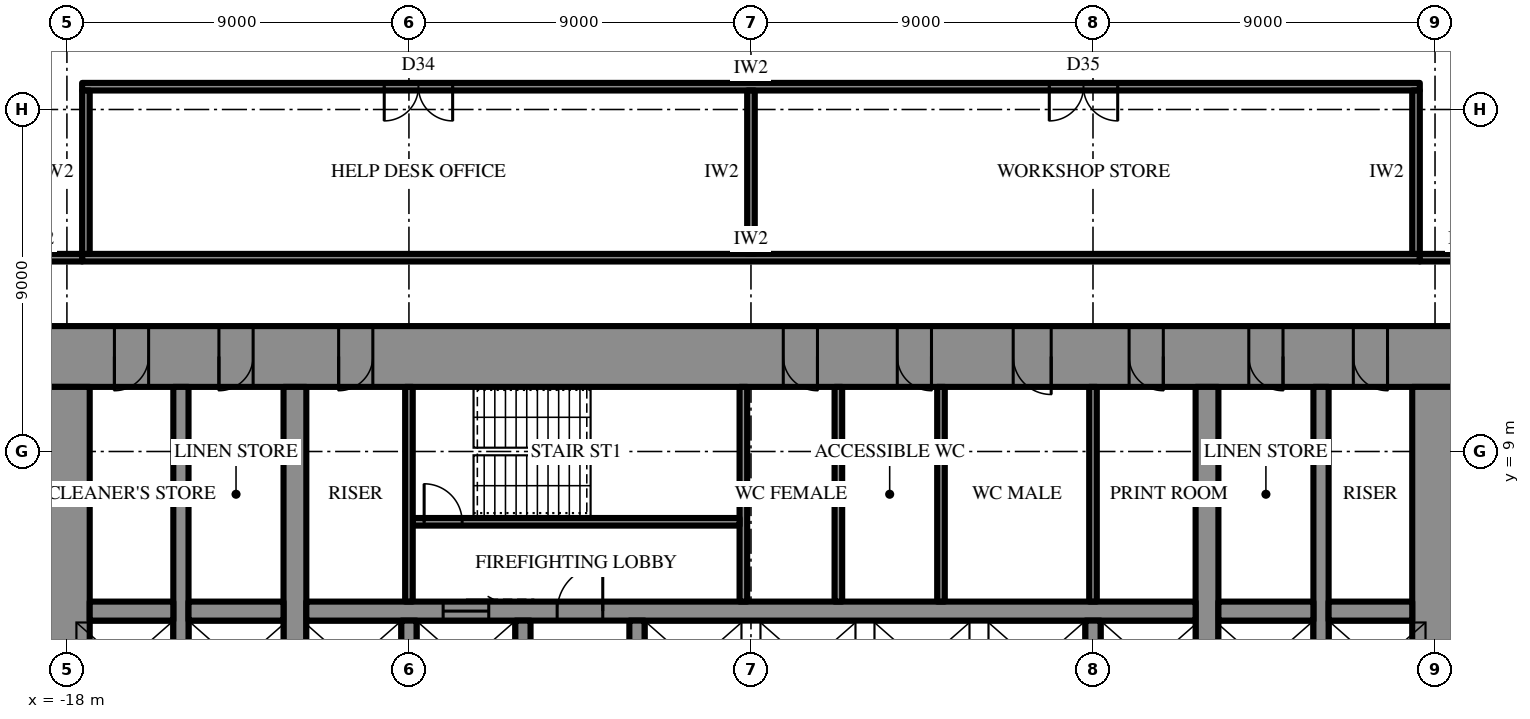
"""IFC4 building model, lengths in metres.
Left out: names, types, materials, properties, quantities, classifications, styles, units other than length and angle.
Written with IfcOpenShell. Run it as: python <this file> out.ifc"""

import sys

from ifc_helpers import new_model, si_unit, direction, frame, frame_2d, origin, place, context, subcontext, project, spatial, rectangle, extrude, element, fill, save


model = new_model("IFC4")
c1 = context("Model", 3, precision=1e-05, world=origin(), true_north=direction((0.0, 1.0)))
c2 = subcontext(c1, "Body", "Model", "MODEL_VIEW")
j1 = project(units=[si_unit("LENGTHUNIT", "METRE"), si_unit("PLANEANGLEUNIT", "RADIAN")], contexts=[c1])
p1 = place(None, origin())
s1 = spatial("IfcSite", under=j1, at=p1, CompositionType="ELEMENT")
p2 = place(p1, origin())
s2 = spatial("IfcBuilding", under=s1, at=p2, CompositionType="ELEMENT")
p3 = place(p2, frame((0.0, 0.0, 90.7)))
s3 = spatial("IfcBuildingStorey", under=s2, at=p3, CompositionType="ELEMENT", Elevation=90.7)
p4 = place(p3, frame((-18.6, 11.5, 0.0), z_axis=(0.0, 0.0, 1.0), x_axis=(1.0, 0.0, 0.0)))
e1 = element("IfcWall", 1, at=p4, inside=s3, PredefinedType="SHEAR", context=c2, shape_type="SweptSolid", body=[
    extrude(rectangle(XDim=37.2, YDim=1.6, at=frame_2d((18.6, 0.0))), origin(), (0.0, 0.0, 1.0), 4.2),
])
p5 = place(p4, frame((19.45, 0.0, 0.0)))
e2 = element("IfcOpeningElement", 2, at=p5, cuts=e1, PredefinedType="OPENING", context=c2, shape_type="SweptSolid", body=[
    extrude(rectangle(XDim=0.9, YDim=2.2, at=frame_2d((0.45, 1.1))), frame((0.0, 0.81, 0.0), z_axis=(0.0, -1.0, 0.0), x_axis=(1.0, 0.0, 0.0)), (0.0, 0.0, 1.0), 1.62),
])
p6 = place(p4, frame((22.45, 0.0, 0.0)))
e3 = element("IfcOpeningElement", 3, at=p6, cuts=e1, PredefinedType="OPENING", context=c2, shape_type="SweptSolid", body=[
    extrude(rectangle(XDim=0.9, YDim=2.2, at=frame_2d((0.45, 1.1))), frame((0.0, 0.81, 0.0), z_axis=(0.0, -1.0, 0.0), x_axis=(1.0, 0.0, 0.0)), (0.0, 0.0, 1.0), 1.62),
])
p7 = place(p4, frame((25.5, 0.0, 0.0)))
e4 = element("IfcOpeningElement", 4, at=p7, cuts=e1, PredefinedType="OPENING", context=c2, shape_type="SweptSolid", body=[
    extrude(rectangle(XDim=1.0, YDim=2.2, at=frame_2d((0.5, 1.1))), frame((0.0, 0.81, 0.0), z_axis=(0.0, -1.0, 0.0), x_axis=(1.0, 0.0, 0.0)), (0.0, 0.0, 1.0), 1.62),
])
p8 = place(p4, frame((1.85, 0.0, 0.0)))
e5 = element("IfcOpeningElement", 5, at=p8, cuts=e1, PredefinedType="OPENING", context=c2, shape_type="SweptSolid", body=[
    extrude(rectangle(XDim=0.9, YDim=2.2, at=frame_2d((0.45, 1.1))), frame((0.0, 0.81, 0.0), z_axis=(0.0, -1.0, 0.0), x_axis=(1.0, 0.0, 0.0)), (0.0, 0.0, 1.0), 1.62),
])
p9 = place(p4, frame((4.6, 0.0, 0.0)))
e6 = element("IfcOpeningElement", 6, at=p9, cuts=e1, PredefinedType="OPENING", context=c2, shape_type="SweptSolid", body=[
    extrude(rectangle(XDim=0.9, YDim=2.2, at=frame_2d((0.45, 1.1))), frame((0.0, 0.81, 0.0), z_axis=(0.0, -1.0, 0.0), x_axis=(1.0, 0.0, 0.0)), (0.0, 0.0, 1.0), 1.62),
])
p10 = place(p4, frame((7.75, 0.0, 0.0)))
e7 = element("IfcOpeningElement", 7, at=p10, cuts=e1, PredefinedType="OPENING", context=c2, shape_type="SweptSolid", body=[
    extrude(rectangle(XDim=0.9, YDim=2.2, at=frame_2d((0.45, 1.1))), frame((0.0, 0.81, 0.0), z_axis=(0.0, -1.0, 0.0), x_axis=(1.0, 0.0, 0.0)), (0.0, 0.0, 1.0), 1.62),
])
p11 = place(p4, frame((28.55, 0.0, 0.0)))
e8 = element("IfcOpeningElement", 8, at=p11, cuts=e1, PredefinedType="OPENING", context=c2, shape_type="SweptSolid", body=[
    extrude(rectangle(XDim=0.9, YDim=2.2, at=frame_2d((0.45, 1.1))), frame((0.0, 0.81, 0.0), z_axis=(0.0, -1.0, 0.0), x_axis=(1.0, 0.0, 0.0)), (0.0, 0.0, 1.0), 1.62),
])
p12 = place(p4, frame((31.7, 0.0, 0.0)))
e9 = element("IfcOpeningElement", 9, at=p12, cuts=e1, PredefinedType="OPENING", context=c2, shape_type="SweptSolid", body=[
    extrude(rectangle(XDim=0.9, YDim=2.2, at=frame_2d((0.45, 1.1))), frame((0.0, 0.81, 0.0), z_axis=(0.0, -1.0, 0.0), x_axis=(1.0, 0.0, 0.0)), (0.0, 0.0, 1.0), 1.62),
])
p13 = place(p4, frame((34.45, 0.0, 0.0)))
e10 = element("IfcOpeningElement", 10, at=p13, cuts=e1, PredefinedType="OPENING", context=c2, shape_type="SweptSolid", body=[
    extrude(rectangle(XDim=0.9, YDim=2.2, at=frame_2d((0.45, 1.1))), frame((0.0, 0.81, 0.0), z_axis=(0.0, -1.0, 0.0), x_axis=(1.0, 0.0, 0.0)), (0.0, 0.0, 1.0), 1.62),
])
p14 = place(p3, frame((18.0, -10.7, 0.0), z_axis=(0.0, 0.0, 1.0), x_axis=(0.0, 1.0, 0.0)))
e11 = element("IfcWall", 11, at=p14, inside=s3, PredefinedType="SHEAR", context=c2, shape_type="SweptSolid", body=[
    extrude(rectangle(XDim=21.4, YDim=1.2, at=frame_2d((10.7, 0.0))), origin(), (0.0, 0.0, 1.0), 4.2),
])
p15 = place(p14, frame((9.8, 0.0, 0.0)))
e12 = element("IfcOpeningElement", 12, at=p15, cuts=e11, PredefinedType="OPENING", context=c2, shape_type="SweptSolid", body=[
    extrude(rectangle(XDim=1.8, YDim=2.4, at=frame_2d((0.9, 1.2))), frame((0.0, 0.61, 0.0), z_axis=(0.0, -1.0, 0.0), x_axis=(1.0, 0.0, 0.0)), (0.0, 0.0, 1.0), 1.22),
])
p16 = place(p3, frame((-18.0, 10.7, 0.0), z_axis=(0.0, 0.0, 1.0), x_axis=(0.0, -1.0, 0.0)))
e13 = element("IfcWall", 13, at=p16, inside=s3, PredefinedType="SHEAR", context=c2, shape_type="SweptSolid", body=[
    extrude(rectangle(XDim=21.4, YDim=1.2, at=frame_2d((10.7, 0.0))), origin(), (0.0, 0.0, 1.0), 4.2),
])
p17 = place(p16, frame((9.8, 0.0, 0.0)))
e14 = element("IfcOpeningElement", 14, at=p17, cuts=e13, PredefinedType="OPENING", context=c2, shape_type="SweptSolid", body=[
    extrude(rectangle(XDim=1.8, YDim=2.4, at=frame_2d((0.9, 1.2))), frame((0.0, 0.61, 0.0), z_axis=(0.0, -1.0, 0.0), x_axis=(1.0, 0.0, 0.0)), (0.0, 0.0, 1.0), 1.22),
])
p18 = place(p3, frame((12.0, -10.7, 0.0), z_axis=(0.0, 0.0, 1.0), x_axis=(0.0, 1.0, 0.0)))
e15 = element("IfcWall", 15, at=p18, inside=s3, PredefinedType="SHEAR", context=c2, shape_type="SweptSolid", body=[
    extrude(rectangle(XDim=21.4, YDim=0.6, at=frame_2d((10.7, 0.0))), origin(), (0.0, 0.0, 1.0), 4.2),
])
p19 = place(p18, frame((9.8, 0.0, 0.0)))
e16 = element("IfcOpeningElement", 16, at=p19, cuts=e15, PredefinedType="OPENING", context=c2, shape_type="SweptSolid", body=[
    extrude(rectangle(XDim=1.8, YDim=2.4, at=frame_2d((0.9, 1.2))), frame((0.0, 0.31, 0.0), z_axis=(0.0, -1.0, 0.0), x_axis=(1.0, 0.0, 0.0)), (0.0, 0.0, 1.0), 0.62),
])
p20 = place(p3, frame((-12.0, -10.7, 0.0), z_axis=(0.0, 0.0, 1.0), x_axis=(0.0, 1.0, 0.0)))
e17 = element("IfcWall", 17, at=p20, inside=s3, PredefinedType="SHEAR", context=c2, shape_type="SweptSolid", body=[
    extrude(rectangle(XDim=21.4, YDim=0.6, at=frame_2d((10.7, 0.0))), origin(), (0.0, 0.0, 1.0), 4.2),
])
p21 = place(p20, frame((9.8, 0.0, 0.0)))
e18 = element("IfcOpeningElement", 18, at=p21, cuts=e17, PredefinedType="OPENING", context=c2, shape_type="SweptSolid", body=[
    extrude(rectangle(XDim=1.8, YDim=2.4, at=frame_2d((0.9, 1.2))), frame((0.0, 0.31, 0.0), z_axis=(0.0, -1.0, 0.0), x_axis=(1.0, 0.0, 0.0)), (0.0, 0.0, 1.0), 0.62),
])
p22 = place(p3, frame((15.0, -10.7, 0.0), z_axis=(0.0, 0.0, 1.0), x_axis=(0.0, 1.0, 0.0)))
e19 = element("IfcWall", 19, at=p22, inside=s3, PredefinedType="SHEAR", context=c2, shape_type="SweptSolid", body=[
    extrude(rectangle(XDim=21.4, YDim=0.4, at=frame_2d((10.7, 0.0))), origin(), (0.0, 0.0, 1.0), 4.2),
])
p23 = place(p22, frame((9.8, 0.0, 0.0)))
e20 = element("IfcOpeningElement", 20, at=p23, cuts=e19, PredefinedType="OPENING", context=c2, shape_type="SweptSolid", body=[
    extrude(rectangle(XDim=1.8, YDim=2.4, at=frame_2d((0.9, 1.2))), frame((0.0, 0.21, 0.0), z_axis=(0.0, -1.0, 0.0), x_axis=(1.0, 0.0, 0.0)), (0.0, 0.0, 1.0), 0.42),
])
p24 = place(p3, frame((-15.0, -10.7, 0.0), z_axis=(0.0, 0.0, 1.0), x_axis=(0.0, 1.0, 0.0)))
e21 = element("IfcWall", 21, at=p24, inside=s3, PredefinedType="SHEAR", context=c2, shape_type="SweptSolid", body=[
    extrude(rectangle(XDim=21.4, YDim=0.4, at=frame_2d((10.7, 0.0))), origin(), (0.0, 0.0, 1.0), 4.2),
])
p25 = place(p24, frame((9.8, 0.0, 0.0)))
e22 = element("IfcOpeningElement", 22, at=p25, cuts=e21, PredefinedType="OPENING", context=c2, shape_type="SweptSolid", body=[
    extrude(rectangle(XDim=1.8, YDim=2.4, at=frame_2d((0.9, 1.2))), frame((0.0, 0.21, 0.0), z_axis=(0.0, -1.0, 0.0), x_axis=(1.0, 0.0, 0.0)), (0.0, 0.0, 1.0), 0.42),
])
p26 = place(p3, frame((-17.4, 4.8, 0.0), z_axis=(0.0, 0.0, 1.0), x_axis=(1.0, 0.0, 0.0)))
e23 = element("IfcWall", 23, at=p26, inside=s3, PredefinedType="SHEAR", context=c2, shape_type="SweptSolid", body=[
    extrude(rectangle(XDim=2.2, YDim=0.5, at=frame_2d((1.1, 0.0))), origin(), (0.0, 0.0, 1.0), 4.2),
])
p27 = place(p3, frame((-14.8, 4.8, 0.0), z_axis=(0.0, 0.0, 1.0), x_axis=(1.0, 0.0, 0.0)))
e24 = element("IfcWall", 24, at=p27, inside=s3, PredefinedType="SHEAR", context=c2, shape_type="SweptSolid", body=[
    extrude(rectangle(XDim=2.5, YDim=0.5, at=frame_2d((1.25, 0.0))), origin(), (0.0, 0.0, 1.0), 4.2),
])
p28 = place(p3, frame((-11.7, 4.8, 0.0), z_axis=(0.0, 0.0, 1.0), x_axis=(1.0, 0.0, 0.0)))
e25 = element("IfcWall", 25, at=p28, inside=s3, PredefinedType="SHEAR", context=c2, shape_type="SweptSolid", body=[
    extrude(rectangle(XDim=23.4, YDim=0.5, at=frame_2d((11.7, 0.0))), origin(), (0.0, 0.0, 1.0), 4.2),
])
p29 = place(p28, frame((6.6, 0.0, 0.0)))
e26 = element("IfcOpeningElement", 26, at=p29, cuts=e25, PredefinedType="OPENING", context=c2, shape_type="SweptSolid", body=[
    extrude(rectangle(XDim=1.2, YDim=2.2, at=frame_2d((0.6, 1.1))), frame((0.0, 0.26, 0.0), z_axis=(0.0, -1.0, 0.0), x_axis=(1.0, 0.0, 0.0)), (0.0, 0.0, 1.0), 0.52),
])
p30 = place(p28, frame((3.6, 0.0, 0.0)))
e27 = element("IfcOpeningElement", 27, at=p30, cuts=e25, PredefinedType="OPENING", context=c2, shape_type="SweptSolid", body=[
    extrude(rectangle(XDim=1.2, YDim=2.2, at=frame_2d((0.6, 1.1))), frame((0.0, 0.26, 0.0), z_axis=(0.0, -1.0, 0.0), x_axis=(1.0, 0.0, 0.0)), (0.0, 0.0, 1.0), 0.52),
])
p31 = place(p3, frame((12.3, 4.8, 0.0), z_axis=(0.0, 0.0, 1.0), x_axis=(1.0, 0.0, 0.0)))
e28 = element("IfcWall", 28, at=p31, inside=s3, PredefinedType="SHEAR", context=c2, shape_type="SweptSolid", body=[
    extrude(rectangle(XDim=2.5, YDim=0.5, at=frame_2d((1.25, 0.0))), origin(), (0.0, 0.0, 1.0), 4.2),
])
p32 = place(p3, frame((15.2, 4.8, 0.0), z_axis=(0.0, 0.0, 1.0), x_axis=(1.0, 0.0, 0.0)))
e29 = element("IfcWall", 29, at=p32, inside=s3, PredefinedType="SHEAR", context=c2, shape_type="SweptSolid", body=[
    extrude(rectangle(XDim=2.2, YDim=0.5, at=frame_2d((1.1, 0.0))), origin(), (0.0, 0.0, 1.0), 4.2),
])
for number, where, z_axis, x_axis in (
    (30, (-9.0, 2.25, 0.0), (0.0, 0.0, 1.0), (0.0, 1.0, 0.0)),
    (31, (-6.0, 2.25, 0.0), (0.0, 0.0, 1.0), (0.0, 1.0, 0.0)),
    (32, (-3.0, 2.25, 0.0), (0.0, 0.0, 1.0), (0.0, 1.0, 0.0)),
    (33, (9.0, 2.25, 0.0), (0.0, 0.0, 1.0), (0.0, 1.0, 0.0)),
):
    element("IfcWall", number, at=place(p3, frame(where, z_axis=z_axis, x_axis=x_axis)), inside=s3, PredefinedType="SHEAR", context=c2, shape_type="SweptSolid", body=[
        extrude(rectangle(XDim=2.3, YDim=0.4, at=frame_2d((1.15, 0.0))), origin(), (0.0, 0.0, 1.0), 4.2),
    ])
p33 = place(p3, frame((-0.2, 5.05, 0.0), z_axis=(0.0, 0.0, 1.0), x_axis=(0.0, 1.0, 0.0)))
e34 = element("IfcWall", 34, at=p33, inside=s3, PredefinedType="SHEAR", context=c2, shape_type="SweptSolid", body=[
    extrude(rectangle(XDim=5.65, YDim=0.2, at=frame_2d((2.825, 0.0))), origin(), (0.0, 0.0, 1.0), 4.2),
])
p34 = place(p3, frame((-8.9, 7.15, 0.0), z_axis=(0.0, 0.0, 1.0), x_axis=(1.0, 0.0, 0.0)))
e35 = element("IfcWall", 35, at=p34, inside=s3, PredefinedType="SHEAR", context=c2, shape_type="SweptSolid", body=[
    extrude(rectangle(XDim=8.6, YDim=0.2, at=frame_2d((4.3, 0.0))), origin(), (0.0, 0.0, 1.0), 4.2),
])
p35 = place(p34, frame((0.3, 0.0, 0.0)))
e36 = element("IfcOpeningElement", 36, at=p35, cuts=e35, PredefinedType="OPENING", context=c2, shape_type="SweptSolid", body=[
    extrude(rectangle(XDim=1.0, YDim=2.2, at=frame_2d((0.5, 1.1))), frame((0.0, 0.11, 0.0), z_axis=(0.0, -1.0, 0.0), x_axis=(1.0, 0.0, 0.0)), (0.0, 0.0, 1.0), 0.22),
])
for number, where, z_axis, x_axis in (
    (37, (-9.0, 5.05, 0.0), (0.0, 0.0, 1.0), (0.0, 1.0, 0.0)),
    (38, (9.0, 5.05, 0.0), (0.0, 0.0, 1.0), (0.0, 1.0, 0.0)),
    (39, (2.3, 5.05, 0.0), (0.0, 0.0, 1.0), (0.0, 1.0, 0.0)),
    (40, (5.0, 5.05, 0.0), (0.0, 0.0, 1.0), (0.0, 1.0, 0.0)),
):
    element("IfcWall", number, at=place(p3, frame(where, z_axis=z_axis, x_axis=x_axis)), inside=s3, PredefinedType="PARTITIONING", context=c2, shape_type="SweptSolid", body=[
        extrude(rectangle(XDim=5.65, YDim=0.2, at=frame_2d((2.825, 0.0))), origin(), (0.0, 0.0, 1.0), 4.0),
    ])
p36 = place(p3, frame((-17.6, 14.1, 0.0), z_axis=(0.0, 0.0, 1.0), x_axis=(1.0, 0.0, 0.0)))
e41 = element("IfcWall", 41, at=p36, inside=s3, PredefinedType="PARTITIONING", context=c2, shape_type="SweptSolid", body=[
    extrude(rectangle(XDim=35.2, YDim=0.2, at=frame_2d((17.6, 0.0))), origin(), (0.0, 0.0, 1.0), 4.0),
])
p37 = place(p3, frame((-17.6, 18.6, 0.0), z_axis=(0.0, 0.0, 1.0), x_axis=(1.0, 0.0, 0.0)))
e42 = element("IfcWall", 42, at=p37, inside=s3, PredefinedType="PARTITIONING", context=c2, shape_type="SweptSolid", body=[
    extrude(rectangle(XDim=35.2, YDim=0.2, at=frame_2d((17.6, 0.0))), origin(), (0.0, 0.0, 1.0), 4.0),
])
p38 = place(p37, frame((7.95, 0.0, 0.0)))
e43 = element("IfcOpeningElement", 43, at=p38, cuts=e42, PredefinedType="OPENING", context=c2, shape_type="SweptSolid", body=[
    extrude(rectangle(XDim=1.8, YDim=2.4, at=frame_2d((0.9, 1.2))), frame((0.0, 0.11, 0.0), z_axis=(0.0, -1.0, 0.0), x_axis=(1.0, 0.0, 0.0)), (0.0, 0.0, 1.0), 0.22),
])
p39 = place(p37, frame((25.45, 0.0, 0.0)))
e44 = element("IfcOpeningElement", 44, at=p39, cuts=e42, PredefinedType="OPENING", context=c2, shape_type="SweptSolid", body=[
    extrude(rectangle(XDim=1.8, YDim=2.4, at=frame_2d((0.9, 1.2))), frame((0.0, 0.11, 0.0), z_axis=(0.0, -1.0, 0.0), x_axis=(1.0, 0.0, 0.0)), (0.0, 0.0, 1.0), 0.22),
])
p40 = place(p3, frame((-17.5, 14.2, 0.0), z_axis=(0.0, 0.0, 1.0), x_axis=(0.0, 1.0, 0.0)))
e45 = element("IfcWall", 45, at=p40, inside=s3, PredefinedType="PARTITIONING", context=c2, shape_type="SweptSolid", body=[
    extrude(rectangle(XDim=4.3, YDim=0.2, at=frame_2d((2.15, 0.0))), origin(), (0.0, 0.0, 1.0), 4.0),
])
p41 = place(p3, frame((0.0, 14.2, 0.0), z_axis=(0.0, 0.0, 1.0), x_axis=(0.0, 1.0, 0.0)))
e46 = element("IfcWall", 46, at=p41, inside=s3, PredefinedType="PARTITIONING", context=c2, shape_type="SweptSolid", body=[
    extrude(rectangle(XDim=4.3, YDim=0.2, at=frame_2d((2.15, 0.0))), origin(), (0.0, 0.0, 1.0), 2.944),
])
p42 = place(p3, frame((17.5, 14.2, 0.0), z_axis=(0.0, 0.0, 1.0), x_axis=(0.0, 1.0, 0.0)))
e47 = element("IfcWall", 47, at=p42, inside=s3, PredefinedType="PARTITIONING", context=c2, shape_type="SweptSolid", body=[
    extrude(rectangle(XDim=4.3, YDim=0.2, at=frame_2d((2.15, 0.0))), origin(), (0.0, 0.0, 1.0), 4.0),
])
for number, where, z_axis, x_axis in (
    (48, (-20.0, 14.1, 0.0), (0.0, 0.0, 1.0), (1.0, 0.0, 0.0)),
    (49, (17.6, 14.1, 0.0), (0.0, 0.0, 1.0), (1.0, 0.0, 0.0)),
):
    element("IfcWall", number, at=place(p3, frame(where, z_axis=z_axis, x_axis=x_axis)), inside=s3, PredefinedType="PARTITIONING", context=c2, shape_type="SweptSolid", body=[
        extrude(rectangle(XDim=2.4, YDim=0.2, at=frame_2d((1.2, 0.0))), origin(), (0.0, 0.0, 1.0), 4.0),
    ])
p43 = place(p29, origin())
e50 = element("IfcDoor", 50, at=p43, inside=s3, OperationType="SINGLE_SWING_LEFT", PredefinedType="DOOR", context=c2, shape_type="SweptSolid", body=[
    extrude(rectangle(XDim=1.2, YDim=2.2, at=frame_2d((0.6, 1.1))), frame((0.0, 0.025, 0.0), z_axis=(0.0, -1.0, 0.0), x_axis=(1.0, 0.0, 0.0)), (0.0, 0.0, 1.0), 0.05),
])
fill(e26, e50)
p44 = place(p35, origin())
e51 = element("IfcDoor", 51, at=p44, inside=s3, OperationType="SINGLE_SWING_RIGHT", PredefinedType="DOOR", context=c2, shape_type="SweptSolid", body=[
    extrude(rectangle(XDim=1.0, YDim=2.2, at=frame_2d((0.5, 1.1))), frame((0.0, 0.025, 0.0), z_axis=(0.0, -1.0, 0.0), x_axis=(1.0, 0.0, 0.0)), (0.0, 0.0, 1.0), 0.05),
])
fill(e36, e51)
p45 = place(p5, frame((0.9, 0.0, 0.0), z_axis=(0.0, 0.0, 1.0), x_axis=(-1.0, 0.0, 0.0)))
e52 = element("IfcDoor", 52, at=p45, inside=s3, OperationType="SINGLE_SWING_RIGHT", PredefinedType="DOOR", context=c2, shape_type="SweptSolid", body=[
    extrude(rectangle(XDim=0.9, YDim=2.2, at=frame_2d((0.45, 1.1))), frame((0.0, 0.025, 0.0), z_axis=(0.0, -1.0, 0.0), x_axis=(1.0, 0.0, 0.0)), (0.0, 0.0, 1.0), 0.05),
])
fill(e2, e52)
p46 = place(p6, frame((0.9, 0.0, 0.0), z_axis=(0.0, 0.0, 1.0), x_axis=(-1.0, 0.0, 0.0)))
e53 = element("IfcDoor", 53, at=p46, inside=s3, OperationType="SINGLE_SWING_RIGHT", PredefinedType="DOOR", context=c2, shape_type="SweptSolid", body=[
    extrude(rectangle(XDim=0.9, YDim=2.2, at=frame_2d((0.45, 1.1))), frame((0.0, 0.025, 0.0), z_axis=(0.0, -1.0, 0.0), x_axis=(1.0, 0.0, 0.0)), (0.0, 0.0, 1.0), 0.05),
])
fill(e3, e53)
p47 = place(p7, frame((1.0, 0.0, 0.0), z_axis=(0.0, 0.0, 1.0), x_axis=(-1.0, 0.0, 0.0)))
e54 = element("IfcDoor", 54, at=p47, inside=s3, OperationType="SINGLE_SWING_RIGHT", PredefinedType="DOOR", context=c2, shape_type="SweptSolid", body=[
    extrude(rectangle(XDim=1.0, YDim=2.2, at=frame_2d((0.5, 1.1))), frame((0.0, 0.025, 0.0), z_axis=(0.0, -1.0, 0.0), x_axis=(1.0, 0.0, 0.0)), (0.0, 0.0, 1.0), 0.05),
])
fill(e4, e54)
p48 = place(p8, frame((0.9, 0.0, 0.0), z_axis=(0.0, 0.0, 1.0), x_axis=(-1.0, 0.0, 0.0)))
e55 = element("IfcDoor", 55, at=p48, inside=s3, OperationType="SINGLE_SWING_LEFT", PredefinedType="DOOR", context=c2, shape_type="SweptSolid", body=[
    extrude(rectangle(XDim=0.9, YDim=2.2, at=frame_2d((0.45, 1.1))), frame((0.0, 0.025, 0.0), z_axis=(0.0, -1.0, 0.0), x_axis=(1.0, 0.0, 0.0)), (0.0, 0.0, 1.0), 0.05),
])
fill(e5, e55)
p49 = place(p9, frame((0.9, 0.0, 0.0), z_axis=(0.0, 0.0, 1.0), x_axis=(-1.0, 0.0, 0.0)))
e56 = element("IfcDoor", 56, at=p49, inside=s3, OperationType="SINGLE_SWING_LEFT", PredefinedType="DOOR", context=c2, shape_type="SweptSolid", body=[
    extrude(rectangle(XDim=0.9, YDim=2.2, at=frame_2d((0.45, 1.1))), frame((0.0, 0.025, 0.0), z_axis=(0.0, -1.0, 0.0), x_axis=(1.0, 0.0, 0.0)), (0.0, 0.0, 1.0), 0.05),
])
fill(e6, e56)
p50 = place(p10, frame((0.9, 0.0, 0.0), z_axis=(0.0, 0.0, 1.0), x_axis=(-1.0, 0.0, 0.0)))
e57 = element("IfcDoor", 57, at=p50, inside=s3, OperationType="SINGLE_SWING_LEFT", PredefinedType="DOOR", context=c2, shape_type="SweptSolid", body=[
    extrude(rectangle(XDim=0.9, YDim=2.2, at=frame_2d((0.45, 1.1))), frame((0.0, 0.025, 0.0), z_axis=(0.0, -1.0, 0.0), x_axis=(1.0, 0.0, 0.0)), (0.0, 0.0, 1.0), 0.05),
])
fill(e7, e57)
p51 = place(p11, frame((0.9, 0.0, 0.0), z_axis=(0.0, 0.0, 1.0), x_axis=(-1.0, 0.0, 0.0)))
e58 = element("IfcDoor", 58, at=p51, inside=s3, OperationType="SINGLE_SWING_RIGHT", PredefinedType="DOOR", context=c2, shape_type="SweptSolid", body=[
    extrude(rectangle(XDim=0.9, YDim=2.2, at=frame_2d((0.45, 1.1))), frame((0.0, 0.025, 0.0), z_axis=(0.0, -1.0, 0.0), x_axis=(1.0, 0.0, 0.0)), (0.0, 0.0, 1.0), 0.05),
])
fill(e8, e58)
p52 = place(p12, frame((0.9, 0.0, 0.0), z_axis=(0.0, 0.0, 1.0), x_axis=(-1.0, 0.0, 0.0)))
e59 = element("IfcDoor", 59, at=p52, inside=s3, OperationType="SINGLE_SWING_RIGHT", PredefinedType="DOOR", context=c2, shape_type="SweptSolid", body=[
    extrude(rectangle(XDim=0.9, YDim=2.2, at=frame_2d((0.45, 1.1))), frame((0.0, 0.025, 0.0), z_axis=(0.0, -1.0, 0.0), x_axis=(1.0, 0.0, 0.0)), (0.0, 0.0, 1.0), 0.05),
])
fill(e9, e59)
p53 = place(p13, frame((0.9, 0.0, 0.0), z_axis=(0.0, 0.0, 1.0), x_axis=(-1.0, 0.0, 0.0)))
e60 = element("IfcDoor", 60, at=p53, inside=s3, OperationType="SINGLE_SWING_RIGHT", PredefinedType="DOOR", context=c2, shape_type="SweptSolid", body=[
    extrude(rectangle(XDim=0.9, YDim=2.2, at=frame_2d((0.45, 1.1))), frame((0.0, 0.025, 0.0), z_axis=(0.0, -1.0, 0.0), x_axis=(1.0, 0.0, 0.0)), (0.0, 0.0, 1.0), 0.05),
])
fill(e10, e60)
p54 = place(p30, origin())
e61 = element("IfcDoor", 61, at=p54, inside=s3, OperationType="SLIDING_TO_LEFT", PredefinedType="DOOR", context=c2, shape_type="SweptSolid", body=[
    extrude(rectangle(XDim=1.2, YDim=2.2, at=frame_2d((0.6, 1.1))), frame((0.0, 0.025, 0.0), z_axis=(0.0, -1.0, 0.0), x_axis=(1.0, 0.0, 0.0)), (0.0, 0.0, 1.0), 0.05),
])
fill(e27, e61)
p55 = place(p38, frame((1.8, 0.0, 0.0), z_axis=(0.0, 0.0, 1.0), x_axis=(-1.0, 0.0, 0.0)))
e62 = element("IfcDoor", 62, at=p55, inside=s3, OperationType="DOUBLE_DOOR_SINGLE_SWING", PredefinedType="DOOR", context=c2, shape_type="SweptSolid", body=[
    extrude(rectangle(XDim=1.8, YDim=2.4, at=frame_2d((0.9, 1.2))), frame((0.0, 0.025, 0.0), z_axis=(0.0, -1.0, 0.0), x_axis=(1.0, 0.0, 0.0)), (0.0, 0.0, 1.0), 0.05),
])
fill(e43, e62)
p56 = place(p39, frame((1.8, 0.0, 0.0), z_axis=(0.0, 0.0, 1.0), x_axis=(-1.0, 0.0, 0.0)))
e63 = element("IfcDoor", 63, at=p56, inside=s3, OperationType="DOUBLE_DOOR_SINGLE_SWING", PredefinedType="DOOR", context=c2, shape_type="SweptSolid", body=[
    extrude(rectangle(XDim=1.8, YDim=2.4, at=frame_2d((0.9, 1.2))), frame((0.0, 0.025, 0.0), z_axis=(0.0, -1.0, 0.0), x_axis=(1.0, 0.0, 0.0)), (0.0, 0.0, 1.0), 0.05),
])
fill(e44, e63)
save(model, sys.argv[1])
